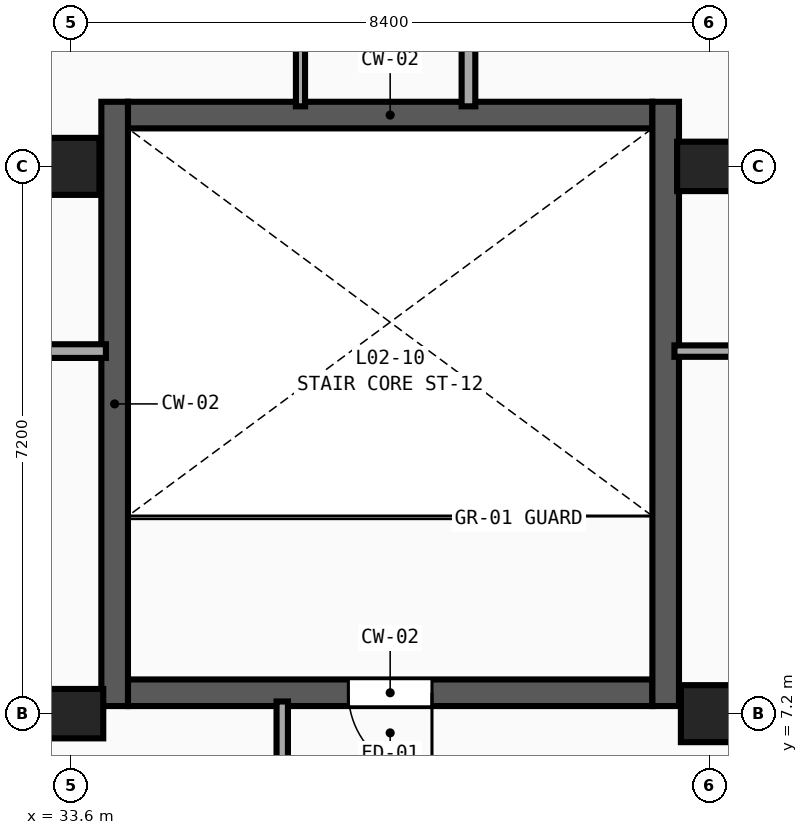
"""IFC4 building model, lengths in metres.
Left out: names, types, materials, properties, quantities, classifications, styles, units other than length and angle.
Written with IfcOpenShell. Run it as: python <this file> out.ifc"""

import sys

from ifc_helpers import new_model, si_unit, direction, frame, frame_2d, origin, origin_2d, place, context, subcontext, project, spatial, rectangle, extrude, element, fill, save


model = new_model("IFC4")
c1 = context("Model", 3, precision=1e-05, world=origin(), true_north=direction((0.0, 1.0)))
c2 = subcontext(c1, "Body", "Model", "MODEL_VIEW")
j1 = project(units=[si_unit("LENGTHUNIT", "METRE"), si_unit("PLANEANGLEUNIT", "RADIAN")], contexts=[c1])
p1 = place(None, origin())
s1 = spatial("IfcSite", under=j1, at=p1, CompositionType="ELEMENT")
p2 = place(p1, origin())
s2 = spatial("IfcBuilding", under=s1, at=p2, CompositionType="ELEMENT")
p3 = place(p2, frame((0.0, 0.0, 9.9)))
s3 = spatial("IfcBuildingStorey", under=s2, at=p3, CompositionType="ELEMENT", Elevation=9.9)
p4 = place(p3, frame((33.6, 7.2, 0.0), z_axis=(0.0, 0.0, 1.0), x_axis=(1.0, 0.0, 0.0)))
e1 = element("IfcColumn", 1, at=p4, inside=s3, PredefinedType="COLUMN", context=c2, shape_type="SweptSolid", body=[
    extrude(rectangle(XDim=0.85, YDim=0.65, at=origin_2d()), origin(), (0.0, 0.0, 1.0), 4.5),
])
for number, where, z_axis, x_axis in (
    (2, (33.6, 14.4, 0.0), (0.0, 0.0, 1.0), (1.0, 0.0, 0.0)),
    (3, (42.0, 7.2, 0.0), (0.0, 0.0, 1.0), (1.0, 0.0, 0.0)),
):
    element("IfcColumn", number, at=place(p3, frame(where, z_axis=z_axis, x_axis=x_axis)), inside=s3, PredefinedType="COLUMN", context=c2, shape_type="SweptSolid", body=[
        extrude(rectangle(XDim=0.75, YDim=0.75, at=origin_2d()), origin(), (0.0, 0.0, 1.0), 4.5),
    ])
p5 = place(p3, frame((42.0, 14.4, 0.0), z_axis=(0.0, 0.0, 1.0), x_axis=(1.0, 0.0, 0.0)))
e4 = element("IfcColumn", 4, at=p5, inside=s3, PredefinedType="COLUMN", context=c2, shape_type="SweptSolid", body=[
    extrude(rectangle(XDim=0.85, YDim=0.65, at=origin_2d()), origin(), (0.0, 0.0, 1.0), 4.5),
])
p6 = place(p3, frame((41.25, 7.475, 0.0), z_axis=(0.0, 0.0, 1.0), x_axis=(-1.0, 0.0, 0.0)))
e5 = element("IfcWall", 5, at=p6, inside=s3, PredefinedType="SHEAR", context=c2, shape_type="SweptSolid", body=[
    extrude(rectangle(XDim=6.9, YDim=0.35, at=frame_2d((3.45, 0.0))), origin(), (0.0, 0.0, 1.0), 4.5),
])
p7 = place(p6, frame((2.9, 0.0, 0.0)))
e6 = element("IfcOpeningElement", 6, at=p7, cuts=e5, PredefinedType="OPENING", context=c2, shape_type="SweptSolid", body=[
    extrude(rectangle(XDim=1.1, YDim=2.2, at=frame_2d((0.55, 1.1))), frame((0.0, 0.195, 0.0), z_axis=(0.0, -1.0, 0.0), x_axis=(1.0, 0.0, 0.0)), (0.0, 0.0, 1.0), 0.39),
])
p8 = place(p3, frame((34.35, 15.075, 0.0), z_axis=(0.0, 0.0, 1.0), x_axis=(1.0, 0.0, 0.0)))
e7 = element("IfcWall", 7, at=p8, inside=s3, PredefinedType="SHEAR", context=c2, shape_type="SweptSolid", body=[
    extrude(rectangle(XDim=6.9, YDim=0.35, at=frame_2d((3.45, 0.0))), origin(), (0.0, 0.0, 1.0), 4.5),
])
for number, where, z_axis, x_axis in (
    (8, (34.175, 15.25, 0.0), (0.0, 0.0, 1.0), (0.0, -1.0, 0.0)),
    (9, (41.425, 7.3, 0.0), (0.0, 0.0, 1.0), (0.0, 1.0, 0.0)),
):
    element("IfcWall", number, at=place(p3, frame(where, z_axis=z_axis, x_axis=x_axis)), inside=s3, PredefinedType="SHEAR", context=c2, shape_type="SweptSolid", body=[
        extrude(rectangle(XDim=7.95, YDim=0.35, at=frame_2d((3.975, 0.0))), origin(), (0.0, 0.0, 1.0), 4.5),
    ])
p9 = place(p3, frame((41.54, 11.97, 0.0), z_axis=(0.0, 0.0, 1.0), x_axis=(1.0, 0.0, 0.0)))
e10 = element("IfcWall", 10, at=p9, inside=s3, PredefinedType="PARTITIONING", context=c2, shape_type="SweptSolid", body=[
    extrude(rectangle(XDim=16.89, YDim=0.15, at=frame_2d((8.445, 0.0))), origin(), (0.0, 0.0, 1.0), 4.18),
])
p10 = place(p9, frame((5.171, 0.0, 0.0)))
e11 = element("IfcOpeningElement", 11, at=p10, cuts=e10, PredefinedType="OPENING", context=c2, shape_type="SweptSolid", body=[
    extrude(rectangle(XDim=1.68, YDim=2.37, at=frame_2d((0.84, 1.185))), frame((0.0, 0.095, 0.0), z_axis=(0.0, -1.0, 0.0), x_axis=(1.0, 0.0, 0.0)), (0.0, 0.0, 1.0), 0.19),
])
p11 = place(p3, frame((22.24, 11.97, 0.0), z_axis=(0.0, 0.0, 1.0), x_axis=(1.0, 0.0, 0.0)))
e12 = element("IfcWall", 12, at=p11, inside=s3, PredefinedType="PARTITIONING", context=c2, shape_type="SweptSolid", body=[
    extrude(rectangle(XDim=11.82, YDim=0.18, at=frame_2d((5.91, 0.0))), origin(), (0.0, 0.0, 1.0), 4.18),
])
p12 = place(p11, frame((5.15, 0.0, 0.0)))
e13 = element("IfcOpeningElement", 13, at=p12, cuts=e12, PredefinedType="OPENING", context=c2, shape_type="SweptSolid", body=[
    extrude(rectangle(XDim=1.52, YDim=2.37, at=frame_2d((0.76, 1.185))), frame((0.0, 0.11, 0.0), z_axis=(0.0, -1.0, 0.0), x_axis=(1.0, 0.0, 0.0)), (0.0, 0.0, 1.0), 0.22),
])
p13 = place(p3, frame((38.83, 15.19, 0.0), z_axis=(0.0, 0.0, 1.0), x_axis=(0.0, 1.0, 0.0)))
e14 = element("IfcWall", 14, at=p13, inside=s3, PredefinedType="PARTITIONING", context=c2, shape_type="SweptSolid", body=[
    extrude(rectangle(XDim=3.43, YDim=0.18, at=frame_2d((1.715, 0.0))), origin(), (0.0, 0.0, 1.0), 4.18),
])
p14 = place(p13, frame((0.955, 0.0, 0.0)))
e15 = element("IfcOpeningElement", 15, at=p14, cuts=e14, PredefinedType="OPENING", context=c2, shape_type="SweptSolid", body=[
    extrude(rectangle(XDim=1.52, YDim=2.13, at=frame_2d((0.76, 1.065))), frame((0.0, 0.11, 0.0), z_axis=(0.0, -1.0, 0.0), x_axis=(1.0, 0.0, 0.0)), (0.0, 0.0, 1.0), 0.22),
])
p15 = place(p3, frame((36.62, 15.19, 0.0), z_axis=(0.0, 0.0, 1.0), x_axis=(0.0, 1.0, 0.0)))
e16 = element("IfcWall", 16, at=p15, inside=s3, PredefinedType="PARTITIONING", context=c2, shape_type="SweptSolid", body=[
    extrude(rectangle(XDim=3.27, YDim=0.12, at=frame_2d((1.635, 0.0))), origin(), (0.0, 0.0, 1.0), 4.18),
])
p16 = place(p15, frame((1.195, 0.0, 0.0)))
e17 = element("IfcOpeningElement", 17, at=p16, cuts=e16, PredefinedType="OPENING", context=c2, shape_type="SweptSolid", body=[
    extrude(rectangle(XDim=0.88, YDim=2.21, at=frame_2d((0.44, 1.105))), frame((0.0, 0.08, 0.0), z_axis=(0.0, -1.0, 0.0), x_axis=(1.0, 0.0, 0.0)), (0.0, 0.0, 1.0), 0.16),
])
p17 = place(p3, frame((36.38, 0.37, 0.0), z_axis=(0.0, 0.0, 1.0), x_axis=(0.0, 1.0, 0.0)))
e18 = element("IfcWall", 18, at=p17, inside=s3, PredefinedType="PARTITIONING", context=c2, shape_type="SweptSolid", body=[
    extrude(rectangle(XDim=6.99, YDim=0.15, at=frame_2d((3.495, 0.0))), origin(), (0.0, 0.0, 1.0), 4.18),
])
p18 = place(p7, origin())
e19 = element("IfcDoor", 19, at=p18, inside=s3, OperationType="SINGLE_SWING_LEFT", PredefinedType="DOOR", context=c2, shape_type="SweptSolid", body=[
    extrude(rectangle(XDim=1.1, YDim=2.2, at=frame_2d((0.55, 1.1))), frame((0.0, 0.025, 0.0), z_axis=(0.0, -1.0, 0.0), x_axis=(1.0, 0.0, 0.0)), (0.0, 0.0, 1.0), 0.05),
])
fill(e6, e19)
save(model, sys.argv[1])
